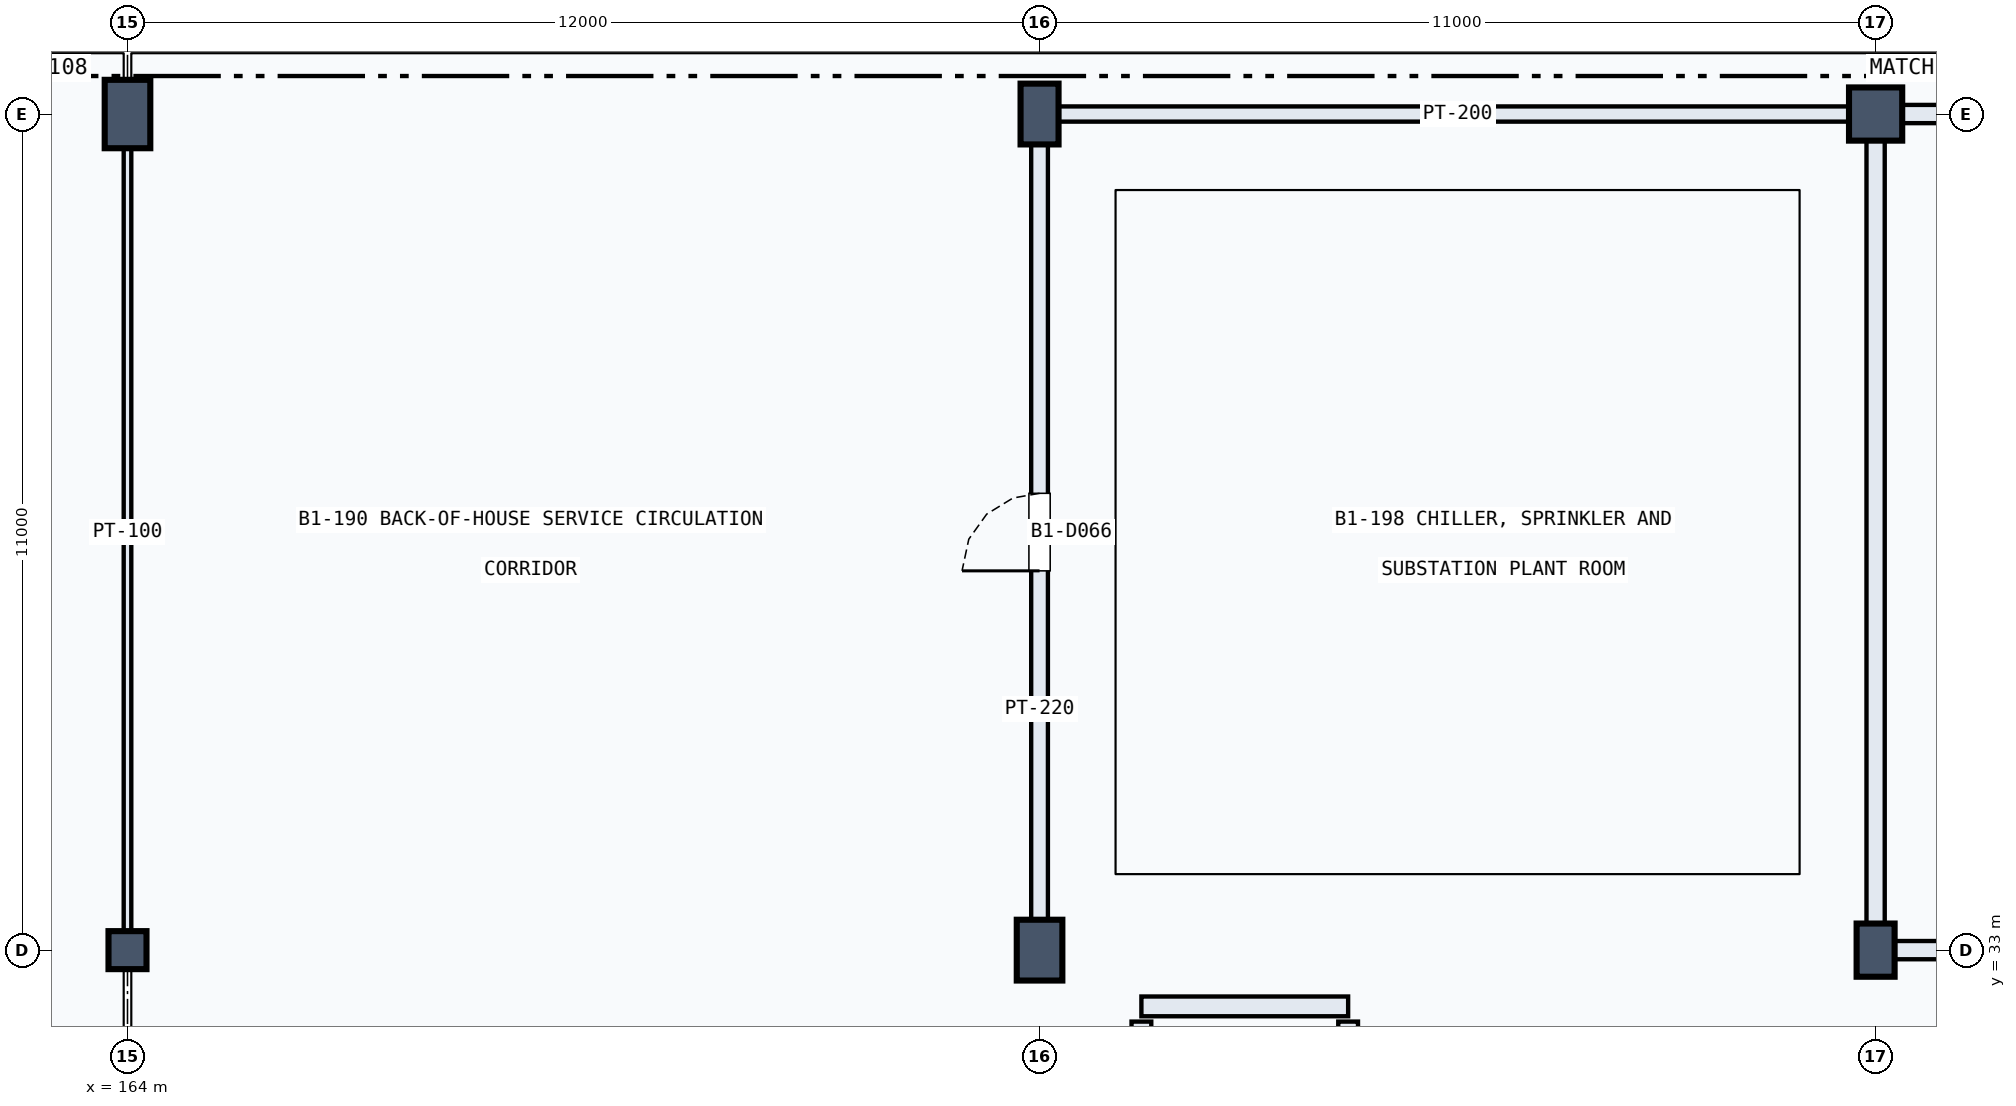
"""IFC4 building model, lengths in metres.
Left out: names, types, materials, properties, quantities, classifications, styles, units other than length and angle.
Written with IfcOpenShell. Run it as: python <this file> out.ifc"""

import sys

from ifc_helpers import new_model, si_unit, direction, frame, frame_2d, origin, origin_2d, place, context, subcontext, project, spatial, rectangle, extrude, element, fill, save


model = new_model("IFC4")
c1 = context("Model", 3, precision=1e-05, world=origin(), true_north=direction((0.0, 1.0)))
c2 = subcontext(c1, "Body", "Model", "MODEL_VIEW")
j1 = project(units=[si_unit("LENGTHUNIT", "METRE"), si_unit("PLANEANGLEUNIT", "RADIAN")], contexts=[c1])
p1 = place(None, origin())
s1 = spatial("IfcSite", under=j1, at=p1, CompositionType="ELEMENT")
p2 = place(p1, origin())
s2 = spatial("IfcBuilding", under=s1, at=p2, CompositionType="ELEMENT")
p3 = place(p2, frame((0.0, 0.0, -5.4)))
s3 = spatial("IfcBuildingStorey", under=s2, at=p3, CompositionType="ELEMENT", Elevation=-5.4)
p4 = place(p3, frame((164.0, 33.0, 0.0), z_axis=(0.0, 0.0, 1.0), x_axis=(1.0, 0.0, 0.0)))
e1 = element("IfcColumn", 1, at=p4, inside=s3, PredefinedType="COLUMN", context=c2, shape_type="SweptSolid", body=[
    extrude(rectangle(XDim=0.5, YDim=0.5, at=origin_2d()), origin(), (0.0, 0.0, 1.0), 5.4),
])
p5 = place(p3, frame((164.0, 44.0, 0.0), z_axis=(0.0, 0.0, 1.0), x_axis=(1.0, 0.0, 0.0)))
e2 = element("IfcColumn", 2, at=p5, inside=s3, PredefinedType="COLUMN", context=c2, shape_type="SweptSolid", body=[
    extrude(rectangle(XDim=0.6, YDim=0.9, at=origin_2d()), origin(), (0.0, 0.0, 1.0), 5.4),
])
p6 = place(p3, frame((176.0, 33.0, 0.0), z_axis=(0.0, 0.0, 1.0), x_axis=(1.0, 0.0, 0.0)))
e3 = element("IfcColumn", 3, at=p6, inside=s3, PredefinedType="COLUMN", context=c2, shape_type="SweptSolid", body=[
    extrude(rectangle(XDim=0.6, YDim=0.8, at=origin_2d()), origin(), (0.0, 0.0, 1.0), 5.4),
])
p7 = place(p3, frame((176.0, 44.0, 0.0), z_axis=(0.0, 0.0, 1.0), x_axis=(1.0, 0.0, 0.0)))
e4 = element("IfcColumn", 4, at=p7, inside=s3, PredefinedType="COLUMN", context=c2, shape_type="SweptSolid", body=[
    extrude(rectangle(XDim=0.5, YDim=0.8, at=origin_2d()), origin(), (0.0, 0.0, 1.0), 5.4),
])
p8 = place(p3, frame((187.0, 33.0, 0.0), z_axis=(0.0, 0.0, 1.0), x_axis=(1.0, 0.0, 0.0)))
e5 = element("IfcColumn", 5, at=p8, inside=s3, PredefinedType="COLUMN", context=c2, shape_type="SweptSolid", body=[
    extrude(rectangle(XDim=0.5, YDim=0.7, at=origin_2d()), origin(), (0.0, 0.0, 1.0), 5.4),
])
p9 = place(p3, frame((187.0, 44.0, 0.0), z_axis=(0.0, 0.0, 1.0), x_axis=(1.0, 0.0, 0.0)))
e6 = element("IfcColumn", 6, at=p9, inside=s3, PredefinedType="COLUMN", context=c2, shape_type="SweptSolid", body=[
    extrude(rectangle(XDim=0.7, YDim=0.7, at=origin_2d()), origin(), (0.0, 0.0, 1.0), 5.4),
])
p10 = place(p3, frame((177.34, 32.26, 0.0), z_axis=(0.0, 0.0, 1.0), x_axis=(1.0, 0.0, 0.0)))
e7 = element("IfcWall", 7, at=p10, inside=s3, PredefinedType="SOLIDWALL", context=c2, shape_type="SweptSolid", body=[
    extrude(rectangle(XDim=2.72, YDim=0.26, at=frame_2d((1.36, 0.0))), origin(), (0.0, 0.0, 1.0), 5.04),
])
for number, where, z_axis, x_axis in (
    (8, (177.34, 29.14, 0.0), (0.0, 0.0, 1.0), (0.0, 1.0, 0.0)),
    (9, (180.06, 29.14, 0.0), (0.0, 0.0, 1.0), (0.0, 1.0, 0.0)),
):
    element("IfcWall", number, at=place(p3, frame(where, z_axis=z_axis, x_axis=x_axis)), inside=s3, PredefinedType="SOLIDWALL", context=c2, shape_type="SweptSolid", body=[
        extrude(rectangle(XDim=2.92, YDim=0.26, at=frame_2d((1.46, 0.0))), origin(), (0.0, 0.0, 1.0), 5.04),
    ])
p11 = place(p3, frame((164.0, 33.21, 0.0), z_axis=(0.0, 0.0, 1.0), x_axis=(0.0, 1.0, 0.0)))
e10 = element("IfcWall", 10, at=p11, inside=s3, PredefinedType="PARTITIONING", context=c2, shape_type="SweptSolid", body=[
    extrude(rectangle(XDim=10.57, YDim=0.1, at=frame_2d((5.285, 0.0))), origin(), (0.0, 0.0, 1.0), 4.41),
])
p12 = place(p3, frame((176.0, 33.22, 0.0), z_axis=(0.0, 0.0, 1.0), x_axis=(0.0, 1.0, 0.0)))
e11 = element("IfcWall", 11, at=p12, inside=s3, PredefinedType="PARTITIONING", context=c2, shape_type="SweptSolid", body=[
    extrude(rectangle(XDim=10.56, YDim=0.22, at=frame_2d((5.28, 0.0))), origin(), (0.0, 0.0, 1.0), 4.08),
])
p13 = place(p12, frame((4.77, 0.0, 0.0)))
e12 = element("IfcOpeningElement", 12, at=p13, cuts=e11, PredefinedType="OPENING", context=c2, shape_type="SweptSolid", body=[
    extrude(rectangle(XDim=1.02, YDim=2.25, at=frame_2d((0.51, 1.125))), frame((0.0, 0.12, 0.0), z_axis=(0.0, -1.0, 0.0), x_axis=(1.0, 0.0, 0.0)), (0.0, 0.0, 1.0), 0.24),
])
p14 = place(p3, frame((176.22, 44.0, 0.0), z_axis=(0.0, 0.0, 1.0), x_axis=(1.0, 0.0, 0.0)))
e13 = element("IfcWall", 13, at=p14, inside=s3, PredefinedType="PARTITIONING", context=c2, shape_type="SweptSolid", body=[
    extrude(rectangle(XDim=10.56, YDim=0.2, at=frame_2d((5.28, 0.0))), origin(), (0.0, 0.0, 1.0), 4.08),
])
p15 = place(p3, frame((187.22, 33.0, 0.0), z_axis=(0.0, 0.0, 1.0), x_axis=(1.0, 0.0, 0.0)))
e14 = element("IfcWall", 14, at=p15, inside=s3, PredefinedType="PARTITIONING", context=c2, shape_type="SweptSolid", body=[
    extrude(rectangle(XDim=10.3, YDim=0.24, at=frame_2d((5.15, 0.0))), origin(), (0.0, 0.0, 1.0), 4.23),
])
p16 = place(p15, frame((4.275, 0.0, 0.0)))
e15 = element("IfcOpeningElement", 15, at=p16, cuts=e14, PredefinedType="OPENING", context=c2, shape_type="SweptSolid", body=[
    extrude(rectangle(XDim=1.75, YDim=2.25, at=frame_2d((0.875, 1.125))), frame((0.0, 0.13, 0.0), z_axis=(0.0, -1.0, 0.0), x_axis=(1.0, 0.0, 0.0)), (0.0, 0.0, 1.0), 0.26),
])
p17 = place(p3, frame((187.22, 44.0, 0.0), z_axis=(0.0, 0.0, 1.0), x_axis=(1.0, 0.0, 0.0)))
e16 = element("IfcWall", 16, at=p17, inside=s3, PredefinedType="PARTITIONING", context=c2, shape_type="SweptSolid", body=[
    extrude(rectangle(XDim=10.3, YDim=0.24, at=frame_2d((5.15, 0.0))), origin(), (0.0, 0.0, 1.0), 4.13),
])
p18 = place(p3, frame((187.0, 33.22, 0.0), z_axis=(0.0, 0.0, 1.0), x_axis=(0.0, 1.0, 0.0)))
e17 = element("IfcWall", 17, at=p18, inside=s3, PredefinedType="PARTITIONING", context=c2, shape_type="SweptSolid", body=[
    extrude(rectangle(XDim=10.56, YDim=0.24, at=frame_2d((5.28, 0.0))), origin(), (0.0, 0.0, 1.0), 4.13),
])
p19 = place(p13, origin())
e18 = element("IfcDoor", 18, at=p19, inside=s3, OperationType="SINGLE_SWING_LEFT", PredefinedType="DOOR", context=c2, shape_type="SweptSolid", body=[
    extrude(rectangle(XDim=1.02, YDim=2.25, at=frame_2d((0.51, 1.125))), frame((0.0, 0.025, 0.0), z_axis=(0.0, -1.0, 0.0), x_axis=(1.0, 0.0, 0.0)), (0.0, 0.0, 1.0), 0.05),
])
fill(e12, e18)
save(model, sys.argv[1])
